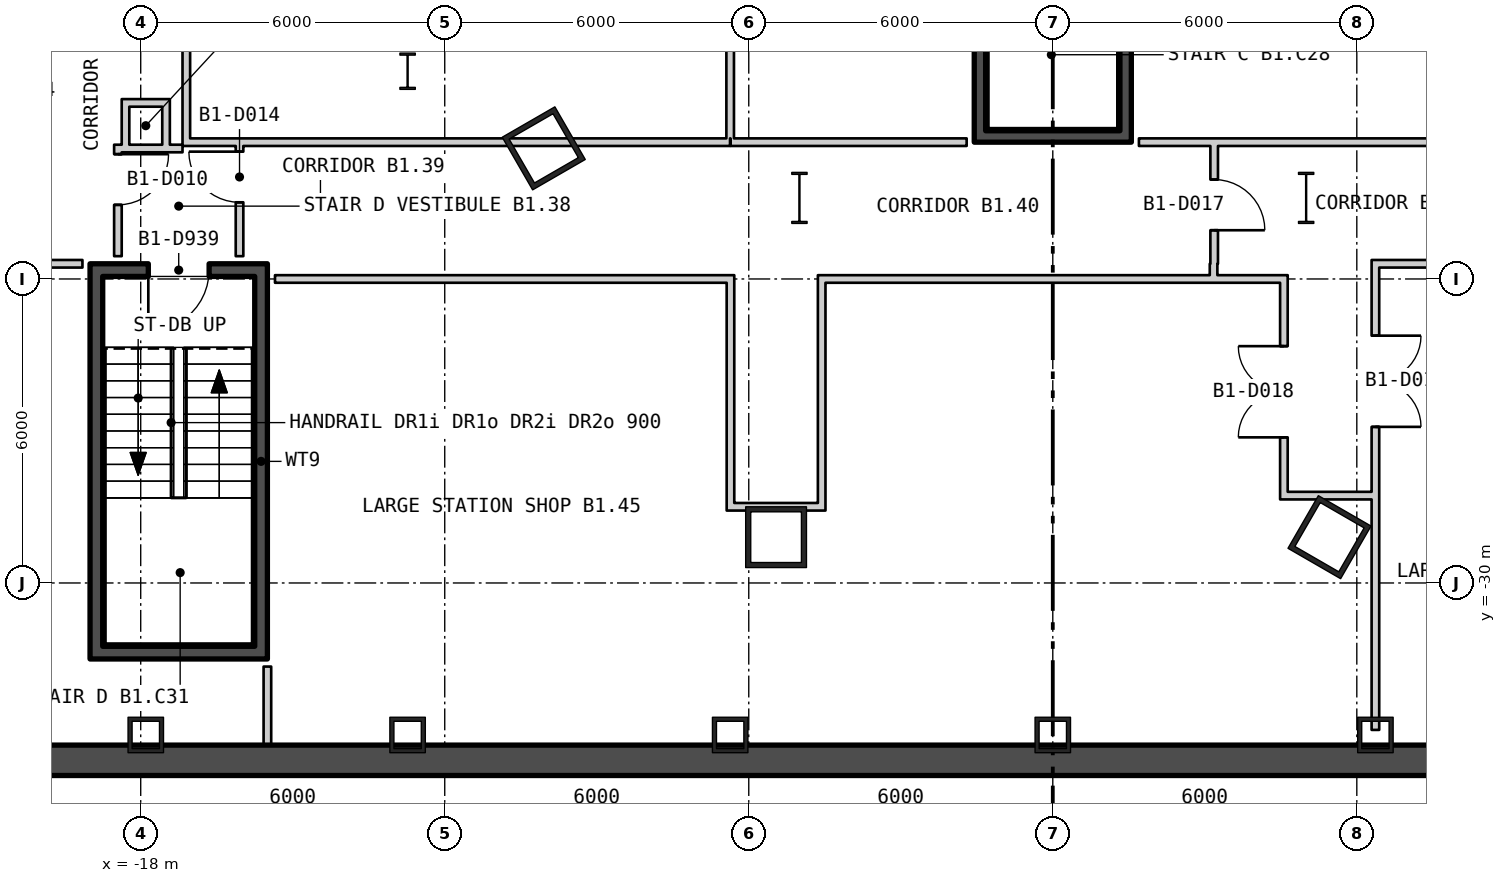
"""IFC4 building model, lengths in metres.
Left out: names, types, materials, properties, quantities, classifications, styles, units other than length and angle.
Written with IfcOpenShell. Run it as: python <this file> out.ifc"""

import sys

from ifc_helpers import new_model, si_unit, direction, frame, frame_2d, origin, origin_2d, place, context, subcontext, project, spatial, rectangle, hollow_rectangle, i_section, extrude, element, fill, save


model = new_model("IFC4")
c1 = context("Model", 3, precision=1e-05, world=origin(), true_north=direction((0.0, 1.0)))
c2 = subcontext(c1, "Body", "Model", "MODEL_VIEW")
j1 = project(units=[si_unit("LENGTHUNIT", "METRE"), si_unit("PLANEANGLEUNIT", "RADIAN")], contexts=[c1])
p1 = place(None, origin())
s1 = spatial("IfcSite", under=j1, at=p1, CompositionType="ELEMENT")
p2 = place(p1, origin())
s2 = spatial("IfcBuilding", under=s1, at=p2, CompositionType="ELEMENT")
p3 = place(p2, frame((0.0, 0.0, -5.7)))
s3 = spatial("IfcBuildingStorey", under=s2, at=p3, CompositionType="ELEMENT", Elevation=-5.7)
for number, where, z_axis, x_axis in (
    (1, (-10.046, -21.422, 0.0), (0.0, 0.0, 1.0), (0.5, -0.866, 0.0)),
    (2, (-5.461, -29.096, 0.0), (0.0, 0.0, 1.0), (1.0, 0.0, 0.0)),
    (3, (5.461, -29.096, 0.0), (0.0, 0.0, 1.0), (0.5, 0.866, 0.0)),
):
    element("IfcColumn", number, at=place(p3, frame(where, z_axis=z_axis, x_axis=x_axis)), inside=s3, PredefinedType="COLUMN", context=c2, shape_type="SweptSolid", body=[
        extrude(hollow_rectangle(XDim=1.2, YDim=1.2, WallThickness=0.1, at=origin_2d()), origin(), (0.0, 0.0, 1.0), 5.7),
    ])
for number, where, z_axis, x_axis in (
    (4, (5.0, -22.4, 0.0), (0.0, 0.0, 1.0), (1.0, 0.0, 0.0)),
    (5, (-5.0, -22.4, 0.0), (0.0, 0.0, 1.0), (1.0, 0.0, 0.0)),
):
    element("IfcColumn", number, at=place(p3, frame(where, z_axis=z_axis, x_axis=x_axis)), inside=s3, PredefinedType="COLUMN", context=c2, shape_type="SweptSolid", body=[
        extrude(i_section(OverallWidth=0.302, OverallDepth=1.008, WebThickness=0.021, FlangeThickness=0.04, at=origin_2d()), origin(), (0.0, 0.0, 1.0), 5.7),
    ])
for number, where, z_axis, x_axis in (
    (6, (-17.9, -33.0, 0.0), (0.0, 0.0, 1.0), (1.0, 0.0, 0.0)),
    (7, (-12.733, -33.0, 0.0), (0.0, 0.0, 1.0), (1.0, 0.0, 0.0)),
    (8, (-6.367, -33.0, 0.0), (0.0, 0.0, 1.0), (1.0, 0.0, 0.0)),
    (9, (0.0, -33.0, 0.0), (0.0, 0.0, 1.0), (1.0, 0.0, 0.0)),
    (10, (6.367, -33.0, 0.0), (0.0, 0.0, 1.0), (1.0, 0.0, 0.0)),
):
    element("IfcColumn", number, at=place(p3, frame(where, z_axis=z_axis, x_axis=x_axis)), inside=s3, PredefinedType="COLUMN", context=c2, shape_type="SweptSolid", body=[
        extrude(hollow_rectangle(XDim=0.7, YDim=0.7, WallThickness=0.08, at=origin_2d()), origin(), (0.0, 0.0, 1.0), 5.7),
    ])
p4 = place(p3, frame((-12.733, -19.9, 0.0), z_axis=(0.0, 0.0, 1.0), x_axis=(1.0, 0.0, 0.0)))
e11 = element("IfcColumn", 11, at=p4, inside=s3, PredefinedType="COLUMN", context=c2, shape_type="SweptSolid", body=[
    extrude(i_section(OverallWidth=0.304, OverallDepth=0.716, WebThickness=0.021, FlangeThickness=0.04, at=origin_2d()), origin(), (0.0, 0.0, 1.0), 5.25),
])
p5 = place(p3, frame((-39.0, -33.5, -0.4), z_axis=(0.0, 0.0, 1.0), x_axis=(1.0, 0.0, 0.0)))
e12 = element("IfcWall", 12, at=p5, inside=s3, PredefinedType="STANDARD", context=c2, shape_type="SweptSolid", body=[
    extrude(rectangle(XDim=78.0, YDim=0.6, at=frame_2d((39.0, 0.0))), origin(), (0.0, 0.0, 1.0), 5.7),
])
p6 = place(p3, frame((-1.438, -21.075, 0.0), z_axis=(0.0, 0.0, 1.0), x_axis=(0.0, 1.0, 0.0)))
e13 = element("IfcWall", 13, at=p6, inside=s3, PredefinedType="SHEAR", context=c2, shape_type="SweptSolid", body=[
    extrude(rectangle(XDim=7.25, YDim=0.225, at=frame_2d((3.625, 0.0))), origin(), (0.0, 0.0, 1.0), 5.25),
])
p7 = place(p3, frame((1.438, -21.075, 0.0), z_axis=(0.0, 0.0, 1.0), x_axis=(0.0, 1.0, 0.0)))
e14 = element("IfcWall", 14, at=p7, inside=s3, PredefinedType="SHEAR", context=c2, shape_type="SweptSolid", body=[
    extrude(rectangle(XDim=7.25, YDim=0.225, at=frame_2d((3.625, 0.0))), origin(), (0.0, 0.0, 1.0), 5.25),
])
p8 = place(p7, frame((5.94, 0.0, 0.0)))
e15 = element("IfcOpeningElement", 15, at=p8, cuts=e14, PredefinedType="OPENING", context=c2, shape_type="SweptSolid", body=[
    extrude(rectangle(XDim=1.0, YDim=2.1, at=frame_2d((0.5, 1.05))), frame((0.0, 0.122, 0.0), z_axis=(0.0, -1.0, 0.0), x_axis=(1.0, 0.0, 0.0)), (0.0, 0.0, 1.0), 0.245),
])
p9 = place(p3, frame((-1.55, -21.188, 0.0), z_axis=(0.0, 0.0, 1.0), x_axis=(1.0, 0.0, 0.0)))
e16 = element("IfcWall", 16, at=p9, inside=s3, PredefinedType="SHEAR", context=c2, shape_type="SweptSolid", body=[
    extrude(rectangle(XDim=3.1, YDim=0.225, at=frame_2d((1.55, 0.0))), origin(), (0.0, 0.0, 1.0), 5.25),
])
for number, where, z_axis, x_axis in (
    (17, (-18.875, -31.25, 0.0), (0.0, 0.0, 1.0), (0.0, 1.0, 0.0)),
    (18, (-15.625, -31.25, 0.0), (0.0, 0.0, 1.0), (0.0, 1.0, 0.0)),
):
    element("IfcWall", number, at=place(p3, frame(where, z_axis=z_axis, x_axis=x_axis)), inside=s3, PredefinedType="SHEAR", context=c2, shape_type="SweptSolid", body=[
        extrude(rectangle(XDim=7.3, YDim=0.25, at=frame_2d((3.65, 0.0))), origin(), (0.0, 0.0, 1.0), 5.25),
    ])
p10 = place(p3, frame((-19.0, -31.375, 0.0), z_axis=(0.0, 0.0, 1.0), x_axis=(1.0, 0.0, 0.0)))
e19 = element("IfcWall", 19, at=p10, inside=s3, PredefinedType="SHEAR", context=c2, shape_type="SweptSolid", body=[
    extrude(rectangle(XDim=3.5, YDim=0.25, at=frame_2d((1.75, 0.0))), origin(), (0.0, 0.0, 1.0), 5.25),
])
p11 = place(p3, frame((-19.0, -23.825, 0.0), z_axis=(0.0, 0.0, 1.0), x_axis=(1.0, 0.0, 0.0)))
e20 = element("IfcWall", 20, at=p11, inside=s3, PredefinedType="SHEAR", context=c2, shape_type="SweptSolid", body=[
    extrude(rectangle(XDim=3.5, YDim=0.25, at=frame_2d((1.75, 0.0))), origin(), (0.0, 0.0, 1.0), 5.25),
])
p12 = place(p11, frame((1.15, 0.0, 0.0)))
e21 = element("IfcOpeningElement", 21, at=p12, cuts=e20, PredefinedType="OPENING", context=c2, shape_type="SweptSolid", body=[
    extrude(rectangle(XDim=1.2, YDim=2.1, at=frame_2d((0.6, 1.05))), frame((0.0, 0.135, 0.0), z_axis=(0.0, -1.0, 0.0), x_axis=(1.0, 0.0, 0.0)), (0.0, 0.0, 1.0), 0.27),
])
p13 = place(p3, frame((-19.825, -23.7, 0.0), z_axis=(0.0, 0.0, 1.0), x_axis=(1.0, 0.0, 0.0)))
e22 = element("IfcWall", 22, at=p13, inside=s3, PredefinedType="PARTITIONING", context=c2, shape_type="SweptSolid", body=[
    extrude(rectangle(XDim=0.675, YDim=0.15, at=frame_2d((0.338, 0.0))), origin(), (0.0, 0.0, 1.0), 5.25),
])
p14 = place(p3, frame((-18.45, -23.55, 0.0), z_axis=(0.0, 0.0, 1.0), x_axis=(0.0, 1.0, 0.0)))
e23 = element("IfcWall", 23, at=p14, inside=s3, PredefinedType="PARTITIONING", context=c2, shape_type="SweptSolid", body=[
    extrude(rectangle(XDim=2.2, YDim=0.15, at=frame_2d((1.1, 0.0))), origin(), (0.0, 0.0, 1.0), 5.25),
])
p15 = place(p14, frame((1.013, 0.0, 0.0)))
e24 = element("IfcOpeningElement", 24, at=p15, cuts=e23, PredefinedType="OPENING", context=c2, shape_type="SweptSolid", body=[
    extrude(rectangle(XDim=1.0, YDim=2.1, at=frame_2d((0.5, 1.05))), frame((0.0, 0.085, 0.0), z_axis=(0.0, -1.0, 0.0), x_axis=(1.0, 0.0, 0.0)), (0.0, 0.0, 1.0), 0.17),
])
p16 = place(p3, frame((-18.3, -21.5, 0.0), z_axis=(0.0, 0.0, 1.0), x_axis=(0.0, 1.0, 0.0)))
e25 = element("IfcWall", 25, at=p16, inside=s3, PredefinedType="PARTITIONING", context=c2, shape_type="SweptSolid", body=[
    extrude(rectangle(XDim=1.05, YDim=0.15, at=frame_2d((0.525, 0.0))), origin(), (0.0, 0.0, 1.0), 5.25),
])
for number, where, z_axis, x_axis in (
    (26, (-18.225, -21.425, 0.0), (0.0, 0.0, 1.0), (1.0, 0.0, 0.0)),
    (27, (-18.225, -20.525, 0.0), (0.0, 0.0, 1.0), (1.0, 0.0, 0.0)),
):
    element("IfcWall", number, at=place(p3, frame(where, z_axis=z_axis, x_axis=x_axis)), inside=s3, PredefinedType="PARTITIONING", context=c2, shape_type="SweptSolid", body=[
        extrude(rectangle(XDim=0.65, YDim=0.15, at=frame_2d((0.325, 0.0))), origin(), (0.0, 0.0, 1.0), 5.25),
    ])
p17 = place(p3, frame((-17.5, -21.5, 0.0), z_axis=(0.0, 0.0, 1.0), x_axis=(0.0, 1.0, 0.0)))
e28 = element("IfcWall", 28, at=p17, inside=s3, PredefinedType="PARTITIONING", context=c2, shape_type="SweptSolid", body=[
    extrude(rectangle(XDim=1.05, YDim=0.15, at=frame_2d((0.525, 0.0))), origin(), (0.0, 0.0, 1.0), 5.25),
])
p18 = place(p3, frame((-17.425, -21.425, 0.0), z_axis=(0.0, 0.0, 1.0), x_axis=(1.0, 0.0, 0.0)))
e29 = element("IfcWall", 29, at=p18, inside=s3, PredefinedType="PARTITIONING", context=c2, shape_type="SweptSolid", body=[
    extrude(rectangle(XDim=0.25, YDim=0.15, at=frame_2d((0.125, 0.0))), origin(), (0.0, 0.0, 1.0), 5.25),
])
p19 = place(p3, frame((-17.175, -21.3, 0.0), z_axis=(0.0, 0.0, 1.0), x_axis=(1.0, 0.0, 0.0)))
e30 = element("IfcWall", 30, at=p19, inside=s3, PredefinedType="PARTITIONING", context=c2, shape_type="SweptSolid", body=[
    extrude(rectangle(XDim=10.805, YDim=0.15, at=frame_2d((5.402, 0.0))), origin(), (0.0, 0.0, 1.0), 5.25),
])
p20 = place(p3, frame((-17.1, -21.225, 0.0), z_axis=(0.0, 0.0, 1.0), x_axis=(0.0, 1.0, 0.0)))
e31 = element("IfcWall", 31, at=p20, inside=s3, PredefinedType="PARTITIONING", context=c2, shape_type="SweptSolid", body=[
    extrude(rectangle(XDim=6.785, YDim=0.15, at=frame_2d((3.393, 0.0))), origin(), (0.0, 0.0, 1.0), 5.25),
])
p21 = place(p20, frame((4.803, 0.0, 0.0)))
e32 = element("IfcOpeningElement", 32, at=p21, cuts=e31, PredefinedType="OPENING", context=c2, shape_type="SweptSolid", body=[
    extrude(rectangle(XDim=1.0, YDim=2.1, at=frame_2d((0.5, 1.05))), frame((0.0, 0.085, 0.0), z_axis=(0.0, -1.0, 0.0), x_axis=(1.0, 0.0, 0.0)), (0.0, 0.0, 1.0), 0.17),
])
p22 = place(p3, frame((-16.05, -23.55, 0.0), z_axis=(0.0, 0.0, 1.0), x_axis=(0.0, 1.0, 0.0)))
e33 = element("IfcWall", 33, at=p22, inside=s3, PredefinedType="PARTITIONING", context=c2, shape_type="SweptSolid", body=[
    extrude(rectangle(XDim=2.175, YDim=0.15, at=frame_2d((1.087, 0.0))), origin(), (0.0, 0.0, 1.0), 5.25),
])
p23 = place(p22, frame((1.063, 0.0, 0.0)))
e34 = element("IfcOpeningElement", 34, at=p23, cuts=e33, PredefinedType="OPENING", context=c2, shape_type="SweptSolid", body=[
    extrude(rectangle(XDim=1.0, YDim=2.1, at=frame_2d((0.5, 1.05))), frame((0.0, 0.085, 0.0), z_axis=(0.0, -1.0, 0.0), x_axis=(1.0, 0.0, 0.0)), (0.0, 0.0, 1.0), 0.17),
])
p24 = place(p3, frame((-15.5, -33.35, 0.0), z_axis=(0.0, 0.0, 1.0), x_axis=(0.0, 1.0, 0.0)))
e35 = element("IfcWall", 35, at=p24, inside=s3, PredefinedType="PARTITIONING", context=c2, shape_type="SweptSolid", body=[
    extrude(rectangle(XDim=1.7, YDim=0.15, at=frame_2d((0.85, 0.0))), origin(), (0.0, 0.0, 1.0), 5.25),
])
p25 = place(p3, frame((-15.35, -24.0, 0.0), z_axis=(0.0, 0.0, 1.0), x_axis=(1.0, 0.0, 0.0)))
e36 = element("IfcWall", 36, at=p25, inside=s3, PredefinedType="PARTITIONING", context=c2, shape_type="SweptSolid", body=[
    extrude(rectangle(XDim=9.064, YDim=0.15, at=frame_2d((4.532, 0.0))), origin(), (0.0, 0.0, 1.0), 5.25),
])
p26 = place(p3, frame((-6.367, -21.225, 0.0), z_axis=(0.0, 0.0, 1.0), x_axis=(0.0, 1.0, 0.0)))
e37 = element("IfcWall", 37, at=p26, inside=s3, PredefinedType="PARTITIONING", context=c2, shape_type="SweptSolid", body=[
    extrude(rectangle(XDim=6.65, YDim=0.15, at=frame_2d((3.325, 0.0))), origin(), (0.0, 0.0, 1.0), 5.25),
])
p27 = place(p3, frame((-6.361, -28.571, 0.0), z_axis=(0.0, 0.0, 1.0), x_axis=(0.0, 1.0, 0.0)))
e38 = element("IfcWall", 38, at=p27, inside=s3, PredefinedType="PARTITIONING", context=c2, shape_type="SweptSolid", body=[
    extrude(rectangle(XDim=4.496, YDim=0.15, at=frame_2d((2.248, 0.0))), origin(), (0.0, 0.0, 1.0), 5.25),
])
p28 = place(p3, frame((-6.361, -21.3, 0.0), z_axis=(0.0, 0.0, 1.0), x_axis=(1.0, 0.0, 0.0)))
e39 = element("IfcWall", 39, at=p28, inside=s3, PredefinedType="PARTITIONING", context=c2, shape_type="SweptSolid", body=[
    extrude(rectangle(XDim=4.661, YDim=0.15, at=frame_2d((2.33, 0.0))), origin(), (0.0, 0.0, 1.0), 5.25),
])
p29 = place(p3, frame((-6.286, -28.496, 0.0), z_axis=(0.0, 0.0, 1.0), x_axis=(1.0, 0.0, 0.0)))
e40 = element("IfcWall", 40, at=p29, inside=s3, PredefinedType="PARTITIONING", context=c2, shape_type="SweptSolid", body=[
    extrude(rectangle(XDim=1.65, YDim=0.15, at=frame_2d((0.825, 0.0))), origin(), (0.0, 0.0, 1.0), 5.25),
])
p30 = place(p3, frame((-4.636, -24.0, 0.0), z_axis=(0.0, 0.0, 1.0), x_axis=(1.0, 0.0, 0.0)))
e41 = element("IfcWall", 41, at=p30, inside=s3, PredefinedType="PARTITIONING", context=c2, shape_type="SweptSolid", body=[
    extrude(rectangle(XDim=9.272, YDim=0.15, at=frame_2d((4.636, 0.0))), origin(), (0.0, 0.0, 1.0), 5.25),
])
p31 = place(p3, frame((-4.561, -28.571, 0.0), z_axis=(0.0, 0.0, 1.0), x_axis=(0.0, 1.0, 0.0)))
e42 = element("IfcWall", 42, at=p31, inside=s3, PredefinedType="PARTITIONING", context=c2, shape_type="SweptSolid", body=[
    extrude(rectangle(XDim=4.496, YDim=0.15, at=frame_2d((2.248, 0.0))), origin(), (0.0, 0.0, 1.0), 5.25),
])
p32 = place(p3, frame((1.7, -21.3, 0.0), z_axis=(0.0, 0.0, 1.0), x_axis=(1.0, 0.0, 0.0)))
e43 = element("IfcWall", 43, at=p32, inside=s3, PredefinedType="PARTITIONING", context=c2, shape_type="SweptSolid", body=[
    extrude(rectangle(XDim=15.325, YDim=0.15, at=frame_2d((7.662, 0.0))), origin(), (0.0, 0.0, 1.0), 5.25),
])
p33 = place(p3, frame((3.173, -23.925, 0.0), z_axis=(0.0, 0.0, 1.0), x_axis=(0.0, 1.0, 0.0)))
e44 = element("IfcWall", 44, at=p33, inside=s3, PredefinedType="PARTITIONING", context=c2, shape_type="SweptSolid", body=[
    extrude(rectangle(XDim=0.225, YDim=0.15, at=frame_2d((0.113, 0.0))), origin(), (0.0, 0.0, 1.0), 5.25),
])
p34 = place(p3, frame((3.185, -23.7, 0.0), z_axis=(0.0, 0.0, 1.0), x_axis=(0.0, 1.0, 0.0)))
e45 = element("IfcWall", 45, at=p34, inside=s3, PredefinedType="PARTITIONING", context=c2, shape_type="SweptSolid", body=[
    extrude(rectangle(XDim=2.325, YDim=0.15, at=frame_2d((1.163, 0.0))), origin(), (0.0, 0.0, 1.0), 5.25),
])
p35 = place(p34, frame((0.662, 0.0, 0.0)))
e46 = element("IfcOpeningElement", 46, at=p35, cuts=e45, PredefinedType="OPENING", context=c2, shape_type="SweptSolid", body=[
    extrude(rectangle(XDim=1.0, YDim=2.1, at=frame_2d((0.5, 1.05))), frame((0.0, 0.085, 0.0), z_axis=(0.0, -1.0, 0.0), x_axis=(1.0, 0.0, 0.0)), (0.0, 0.0, 1.0), 0.17),
])
p36 = place(p3, frame((4.561, -28.351, 0.0), z_axis=(0.0, 0.0, 1.0), x_axis=(0.0, 1.0, 0.0)))
e47 = element("IfcWall", 47, at=p36, inside=s3, PredefinedType="PARTITIONING", context=c2, shape_type="SweptSolid", body=[
    extrude(rectangle(XDim=4.276, YDim=0.15, at=frame_2d((2.138, 0.0))), origin(), (0.0, 0.0, 1.0), 5.25),
])
p37 = place(p36, frame((1.225, 0.0, 0.0)))
e48 = element("IfcOpeningElement", 48, at=p37, cuts=e47, PredefinedType="OPENING", context=c2, shape_type="SweptSolid", body=[
    extrude(rectangle(XDim=1.8, YDim=2.1, at=frame_2d((0.9, 1.05))), frame((0.0, 0.085, 0.0), z_axis=(0.0, -1.0, 0.0), x_axis=(1.0, 0.0, 0.0)), (0.0, 0.0, 1.0), 0.17),
])
p38 = place(p3, frame((4.636, -28.276, 0.0), z_axis=(0.0, 0.0, 1.0), x_axis=(1.0, 0.0, 0.0)))
e49 = element("IfcWall", 49, at=p38, inside=s3, PredefinedType="PARTITIONING", context=c2, shape_type="SweptSolid", body=[
    extrude(rectangle(XDim=1.656, YDim=0.15, at=frame_2d((0.828, 0.0))), origin(), (0.0, 0.0, 1.0), 5.25),
])
p39 = place(p3, frame((6.367, -32.9, 0.0), z_axis=(0.0, 0.0, 1.0), x_axis=(0.0, 1.0, 0.0)))
e50 = element("IfcWall", 50, at=p39, inside=s3, PredefinedType="PARTITIONING", context=c2, shape_type="SweptSolid", body=[
    extrude(rectangle(XDim=9.275, YDim=0.15, at=frame_2d((4.638, 0.0))), origin(), (0.0, 0.0, 1.0), 5.25),
])
p40 = place(p39, frame((5.981, 0.0, 0.0)))
e51 = element("IfcOpeningElement", 51, at=p40, cuts=e50, PredefinedType="OPENING", context=c2, shape_type="SweptSolid", body=[
    extrude(rectangle(XDim=1.8, YDim=2.1, at=frame_2d((0.9, 1.05))), frame((0.0, 0.085, 0.0), z_axis=(0.0, -1.0, 0.0), x_axis=(1.0, 0.0, 0.0)), (0.0, 0.0, 1.0), 0.17),
])
p41 = place(p3, frame((6.442, -23.7, 0.0), z_axis=(0.0, 0.0, 1.0), x_axis=(1.0, 0.0, 0.0)))
e52 = element("IfcWall", 52, at=p41, inside=s3, PredefinedType="PARTITIONING", context=c2, shape_type="SweptSolid", body=[
    extrude(rectangle(XDim=6.191, YDim=0.15, at=frame_2d((3.095, 0.0))), origin(), (0.0, 0.0, 1.0), 5.25),
])
p42 = place(p12, origin())
e53 = element("IfcDoor", 53, at=p42, inside=s3, OperationType="SINGLE_SWING_LEFT", PredefinedType="DOOR", context=c2, shape_type="SweptSolid", body=[
    extrude(rectangle(XDim=1.2, YDim=2.1, at=frame_2d((0.6, 1.05))), frame((0.0, 0.025, 0.0), z_axis=(0.0, -1.0, 0.0), x_axis=(1.0, 0.0, 0.0)), (0.0, 0.0, 1.0), 0.05),
])
fill(e21, e53)
p43 = place(p15, origin())
e54 = element("IfcDoor", 54, at=p43, inside=s3, OperationType="SINGLE_SWING_RIGHT", PredefinedType="DOOR", context=c2, shape_type="SweptSolid", body=[
    extrude(rectangle(XDim=1.0, YDim=2.1, at=frame_2d((0.5, 1.05))), frame((0.0, 0.025, 0.0), z_axis=(0.0, -1.0, 0.0), x_axis=(1.0, 0.0, 0.0)), (0.0, 0.0, 1.0), 0.05),
])
fill(e24, e54)
p44 = place(p23, origin())
e55 = element("IfcDoor", 55, at=p44, inside=s3, OperationType="SINGLE_SWING_LEFT", PredefinedType="DOOR", context=c2, shape_type="SweptSolid", body=[
    extrude(rectangle(XDim=1.0, YDim=2.1, at=frame_2d((0.5, 1.05))), frame((0.0, 0.025, 0.0), z_axis=(0.0, -1.0, 0.0), x_axis=(1.0, 0.0, 0.0)), (0.0, 0.0, 1.0), 0.05),
])
fill(e34, e55)
p45 = place(p35, origin())
e56 = element("IfcDoor", 56, at=p45, inside=s3, OperationType="SINGLE_SWING_LEFT", PredefinedType="DOOR", context=c2, shape_type="SweptSolid", body=[
    extrude(rectangle(XDim=1.0, YDim=2.1, at=frame_2d((0.5, 1.05))), frame((0.0, 0.025, 0.0), z_axis=(0.0, -1.0, 0.0), x_axis=(1.0, 0.0, 0.0)), (0.0, 0.0, 1.0), 0.05),
])
fill(e46, e56)
p46 = place(p37, origin())
e57 = element("IfcDoor", 57, at=p46, inside=s3, OperationType="DOUBLE_DOOR_SINGLE_SWING", PredefinedType="DOOR", context=c2, shape_type="SweptSolid", body=[
    extrude(rectangle(XDim=1.8, YDim=2.1, at=frame_2d((0.9, 1.05))), frame((0.0, 0.025, 0.0), z_axis=(0.0, -1.0, 0.0), x_axis=(1.0, 0.0, 0.0)), (0.0, 0.0, 1.0), 0.05),
])
fill(e48, e57)
p47 = place(p40, origin())
e58 = element("IfcDoor", 58, at=p47, inside=s3, OperationType="DOUBLE_DOOR_SINGLE_SWING", PredefinedType="DOOR", context=c2, shape_type="SweptSolid", body=[
    extrude(rectangle(XDim=1.8, YDim=2.1, at=frame_2d((0.9, 1.05))), frame((0.0, 0.025, 0.0), z_axis=(0.0, -1.0, 0.0), x_axis=(1.0, 0.0, 0.0)), (0.0, 0.0, 1.0), 0.05),
])
fill(e51, e58)
save(model, sys.argv[1])
